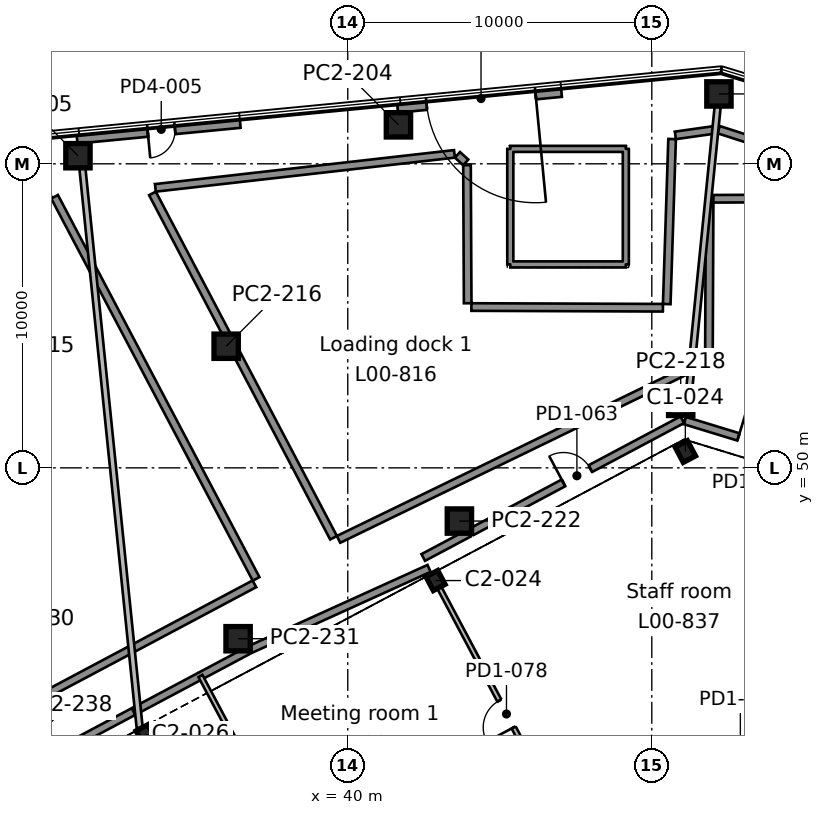
"""IFC4 building model, lengths in metres.
Left out: names, types, materials, properties, quantities, classifications, styles, units other than length and angle.
Written with IfcOpenShell. Run it as: python <this file> out.ifc"""

import sys

from ifc_helpers import new_model, si_unit, direction, frame, frame_2d, origin, origin_2d, place, context, subcontext, project, spatial, rectangle, i_section, extrude, element, fill, save


model = new_model("IFC4")
c1 = context("Model", 3, precision=1e-05, world=origin(), true_north=direction((0.0, 1.0)))
c2 = subcontext(c1, "Body", "Model", "MODEL_VIEW")
j1 = project(units=[si_unit("LENGTHUNIT", "METRE"), si_unit("PLANEANGLEUNIT", "RADIAN")], contexts=[c1])
p1 = place(None, origin())
s1 = spatial("IfcSite", under=j1, at=p1, CompositionType="ELEMENT")
p2 = place(p1, origin())
s2 = spatial("IfcBuilding", under=s1, at=p2, CompositionType="ELEMENT")
p3 = place(p2, origin())
s3 = spatial("IfcBuildingStorey", under=s2, at=p3, CompositionType="ELEMENT", Elevation=0.0)
for number, where, z_axis, x_axis in (
    (1, (33.351, 41.223, 0.0), (0.0, 0.0, 1.0), (-0.883, -0.469, 0.0)),
    (2, (42.887, 46.293, 0.0), (0.0, 0.0, 1.0), (-0.883, -0.469, 0.0)),
):
    element("IfcColumn", number, at=place(p3, frame(where, z_axis=z_axis, x_axis=x_axis)), inside=s3, PredefinedType="COLUMN", context=c2, shape_type="SweptSolid", body=[
        extrude(i_section(OverallWidth=0.437, OverallDepth=0.513, WebThickness=0.061, FlangeThickness=0.097, FilletRadius=0.015, at=origin_2d()), origin(), (0.0, 0.0, 1.0), 7.0),
    ])
p4 = place(p3, frame((51.103, 50.537, 0.0), z_axis=(0.0, 0.0, 1.0), x_axis=(-0.882947592859, -0.469471562786, 0.0)))
e3 = element("IfcColumn", 3, at=p4, inside=s3, PredefinedType="COLUMN", context=c2, shape_type="SweptSolid", body=[
    extrude(i_section(OverallWidth=0.455, OverallDepth=0.569, WebThickness=0.078, FlangeThickness=0.125, FilletRadius=0.015, at=origin_2d()), origin(), (0.0, 0.0, 1.0), 7.0),
])
for number, where, z_axis, x_axis in (
    (4, (36.393, 44.38, 0.0), (0.0, 0.0, 1.0), (1.0, 0.0, 0.0)),
    (5, (43.672, 48.25, 0.0), (0.0, 0.0, 1.0), (1.0, 0.0, 0.0)),
    (6, (50.95, 52.121, 0.0), (0.0, 0.0, 1.0), (1.0, 0.0, 0.0)),
    (7, (36.0, 54.0, 0.0), (0.0, 0.0, 1.0), (1.0, 0.0, 0.0)),
    (8, (31.126, 60.266, 0.0), (0.0, 0.0, 1.0), (1.0, 0.0, 0.0)),
    (9, (41.667, 61.282, 0.0), (0.0, 0.0, 1.0), (1.0, 0.0, 0.0)),
    (10, (52.208, 62.298, 0.0), (0.0, 0.0, 1.0), (1.0, 0.0, 0.0)),
):
    element("IfcColumn", number, at=place(p3, frame(where, z_axis=z_axis, x_axis=x_axis)), inside=s3, PredefinedType="COLUMN", context=c2, shape_type="SweptSolid", body=[
        extrude(rectangle(XDim=0.8, YDim=0.8, at=origin_2d()), origin(), (0.0, 0.0, 1.0), 6.37),
    ])
p5 = place(p3, frame((47.025, 62.401, 0.0), z_axis=(0.0, 0.0, 1.0), x_axis=(-0.995386045025, -0.095951140535, 0.0)))
e11 = element("IfcWall", 11, at=p5, inside=s3, PredefinedType="SOLIDWALL", context=c2, shape_type="SweptSolid", body=[
    extrude(rectangle(XDim=5.417, YDim=0.4, at=frame_2d((2.708, 0.0))), origin(), (0.0, 0.0, 1.0), 6.37),
])
p6 = place(p5, frame((0.854, 0.0, 0.0)))
e12 = element("IfcOpeningElement", 12, at=p6, cuts=e11, PredefinedType="OPENING", context=c2, shape_type="SweptSolid", body=[
    extrude(rectangle(XDim=3.6, YDim=4.5, at=frame_2d((1.8, 2.25))), frame((0.0, 0.21, 0.0), z_axis=(0.0, -1.0, 0.0), x_axis=(1.0, 0.0, 0.0)), (0.0, 0.0, 1.0), 0.42),
])
p7 = place(p3, frame((36.458, 61.382, 0.0), z_axis=(0.0, 0.0, 1.0), x_axis=(-0.99538901021, -0.095920375068, 0.0)))
e13 = element("IfcWall", 13, at=p7, inside=s3, PredefinedType="SOLIDWALL", context=c2, shape_type="SweptSolid", body=[
    extrude(rectangle(XDim=5.391, YDim=0.4, at=frame_2d((2.695, 0.0))), origin(), (0.0, 0.0, 1.0), 6.37),
])
p8 = place(p7, frame((2.154, 0.0, 0.0)))
e14 = element("IfcOpeningElement", 14, at=p8, cuts=e13, PredefinedType="OPENING", context=c2, shape_type="SweptSolid", body=[
    extrude(rectangle(XDim=0.9, YDim=2.1, at=frame_2d((0.45, 1.05))), frame((0.0, 0.21, 0.0), z_axis=(0.0, -1.0, 0.0), x_axis=(1.0, 0.0, 0.0)), (0.0, 0.0, 1.0), 0.42),
])
p9 = place(p3, frame((30.357, 58.915, 7.0), z_axis=(0.0, 0.0, 1.0), x_axis=(0.466457319903, -0.8845437065, 0.0)))
e15 = element("IfcWall", 15, at=p9, inside=s3, PredefinedType="STANDARD", context=c2, shape_type="SweptSolid", body=[
    extrude(rectangle(XDim=14.208, YDim=0.25, at=frame_2d((7.104, 0.0))), origin(), (0.0, 0.0, 1.0), 0.65),
])
p10 = place(p3, frame((36.929, 46.186, 7.0), z_axis=(0.0, 0.0, 1.0), x_axis=(-0.882949235495, -0.469468473423, 0.0)))
e16 = element("IfcWall", 16, at=p10, inside=s3, PredefinedType="STANDARD", context=c2, shape_type="SweptSolid", body=[
    extrude(rectangle(XDim=28.414, YDim=0.25, at=frame_2d((14.207, 0.0))), origin(), (0.0, 0.0, 1.0), 0.65),
])
p11 = place(p3, frame((51.808, 53.523, 7.0), z_axis=(0.0, 0.0, 1.0), x_axis=(-0.89970966322, -0.436488856569, 0.0)))
e17 = element("IfcWall", 17, at=p11, inside=s3, PredefinedType="STANDARD", context=c2, shape_type="SweptSolid", body=[
    extrude(rectangle(XDim=13.462, YDim=0.25, at=frame_2d((6.731, 0.0))), origin(), (0.0, 0.0, 1.0), 0.65),
])
p12 = place(p3, frame((39.532, 47.701, 7.0), z_axis=(0.0, 0.0, 1.0), x_axis=(-0.465482185558, 0.88505724952, 0.0)))
e18 = element("IfcWall", 18, at=p12, inside=s3, PredefinedType="STANDARD", context=c2, shape_type="SweptSolid", body=[
    extrude(rectangle(XDim=12.795, YDim=0.25, at=frame_2d((6.398, 0.0))), origin(), (0.0, 0.0, 1.0), 0.65),
])
p13 = place(p3, frame((33.673, 59.208, 7.0), z_axis=(0.0, 0.0, 1.0), x_axis=(0.993598399312, 0.112969999932, 0.0)))
e19 = element("IfcWall", 19, at=p13, inside=s3, PredefinedType="STANDARD", context=c2, shape_type="SweptSolid", body=[
    extrude(rectangle(XDim=9.9, YDim=0.25, at=frame_2d((4.95, 0.0))), origin(), (0.0, 0.0, 1.0), 0.65),
])
p14 = place(p3, frame((43.607, 60.295, 7.0), z_axis=(0.0, 0.0, 1.0), x_axis=(0.7400298403, -0.672574037163, 0.0)))
e20 = element("IfcWall", 20, at=p14, inside=s3, PredefinedType="STANDARD", context=c2, shape_type="SweptSolid", body=[
    extrude(rectangle(XDim=0.369, YDim=0.25, at=frame_2d((0.185, 0.0))), origin(), (0.0, 0.0, 1.0), 0.65),
])
p15 = place(p3, frame((43.922, 59.955, 7.0), z_axis=(0.0, 0.0, 1.0), x_axis=(0.004999399945, -0.999987502922, 0.0)))
e21 = element("IfcWall", 21, at=p15, inside=s3, PredefinedType="STANDARD", context=c2, shape_type="SweptSolid", body=[
    extrude(rectangle(XDim=4.542, YDim=0.25, at=frame_2d((2.271, 0.0))), origin(), (0.0, 0.0, 1.0), 0.65),
])
p16 = place(p3, frame((44.066, 55.289, 7.0), z_axis=(0.0, 0.0, 1.0), x_axis=(0.999993223506, -0.003681432135, 0.0)))
e22 = element("IfcWall", 22, at=p16, inside=s3, PredefinedType="STANDARD", context=c2, shape_type="SweptSolid", body=[
    extrude(rectangle(XDim=6.3, YDim=0.25, at=frame_2d((3.15, 0.0))), origin(), (0.0, 0.0, 1.0), 0.65),
])
p17 = place(p3, frame((50.491, 55.387, 7.0), z_axis=(0.0, 0.0, 1.0), x_axis=(0.032503507659, 0.999471621403, 0.0)))
e23 = element("IfcWall", 23, at=p17, inside=s3, PredefinedType="STANDARD", context=c2, shape_type="SweptSolid", body=[
    extrude(rectangle(XDim=5.431, YDim=0.25, at=frame_2d((2.715, 0.0))), origin(), (0.0, 0.0, 1.0), 0.65),
])
p18 = place(p3, frame((50.775, 60.934, 7.0), z_axis=(0.0, 0.0, 1.0), x_axis=(0.990122021984, 0.140208350613, 0.0)))
e24 = element("IfcWall", 24, at=p18, inside=s3, PredefinedType="STANDARD", context=c2, shape_type="SweptSolid", body=[
    extrude(rectangle(XDim=1.381, YDim=0.25, at=frame_2d((0.69, 0.0))), origin(), (0.0, 0.0, 1.0), 0.65),
])
p19 = place(p3, frame((52.198, 61.123, 7.0), z_axis=(0.0, 0.0, 1.0), x_axis=(0.951593022615, -0.307360894243, 0.0)))
e25 = element("IfcWall", 25, at=p19, inside=s3, PredefinedType="STANDARD", context=c2, shape_type="SweptSolid", body=[
    extrude(rectangle(XDim=5.816, YDim=0.25, at=frame_2d((2.908, 0.0))), origin(), (0.0, 0.0, 1.0), 0.65),
])
p20 = place(p3, frame((57.574, 58.872, 7.0), z_axis=(0.0, 0.0, 1.0), x_axis=(-0.999991626198, -0.004092374972, 0.0)))
e26 = element("IfcWall", 26, at=p20, inside=s3, PredefinedType="STANDARD", context=c2, shape_type="SweptSolid", body=[
    extrude(rectangle(XDim=5.548, YDim=0.25, at=frame_2d((2.774, 0.0))), origin(), (0.0, 0.0, 1.0), 0.65),
])
p21 = place(p3, frame((51.901, 58.727, 7.0), z_axis=(0.0, 0.0, 1.0), x_axis=(-0.004458890324, -0.999990059099, 0.0)))
e27 = element("IfcWall", 27, at=p21, inside=s3, PredefinedType="STANDARD", context=c2, shape_type="SweptSolid", body=[
    extrude(rectangle(XDim=5.092, YDim=0.25, at=frame_2d((2.546, 0.0))), origin(), (0.0, 0.0, 1.0), 0.65),
])
for number, where, z_axis, x_axis in (
    (28, (49.146, 56.691, 6.92), (0.0, 0.0, 1.0), (-1.0, 0.0, 0.0)),
    (29, (45.346, 56.691, 6.92), (0.0, 0.0, 1.0), (0.0, 1.0, 0.0)),
    (30, (45.346, 60.491, 6.92), (0.0, 0.0, 1.0), (1.0, 0.0, 0.0)),
    (31, (49.146, 60.491, 6.92), (0.0, 0.0, 1.0), (0.0, -1.0, 0.0)),
):
    element("IfcWall", number, at=place(p3, frame(where, z_axis=z_axis, x_axis=x_axis)), inside=s3, PredefinedType="SOLIDWALL", context=c2, shape_type="SweptSolid", body=[
        extrude(rectangle(XDim=3.8, YDim=0.2, at=frame_2d((1.9, 0.0))), origin(), (0.0, 0.0, 1.0), 0.18),
    ])
p22 = place(p3, frame((52.168, 61.898, 0.0), z_axis=(0.0, 0.0, 1.0), x_axis=(-0.100124403506, -0.994974926228, 0.0)))
e32 = element("IfcWall", 32, at=p22, inside=s3, PredefinedType="PARTITIONING", context=c2, shape_type="SweptSolid", body=[
    extrude(rectangle(XDim=9.424, YDim=0.2, at=frame_2d((4.712, 0.0))), origin(), (0.0, 0.0, 1.0), 6.37),
])
p23 = place(p3, frame((51.087, 51.556, 0.0), z_axis=(0.0, 0.0, 1.0), x_axis=(0.956310816829, -0.292351879788, 0.0)))
e33 = element("IfcWall", 33, at=p23, inside=s3, PredefinedType="SOLIDWALL", context=c2, shape_type="SweptSolid", body=[
    extrude(rectangle(XDim=4.651, YDim=0.25, at=frame_2d((2.326, 0.0))), origin(), (0.0, 0.0, 1.0), 6.37),
])
p24 = place(p23, frame((1.844, 0.0, 0.0)))
e34 = element("IfcOpeningElement", 34, at=p24, cuts=e33, PredefinedType="OPENING", context=c2, shape_type="SweptSolid", body=[
    extrude(rectangle(XDim=1.0, YDim=2.1, at=frame_2d((0.5, 1.05))), frame((0.0, 0.135, 0.0), z_axis=(0.0, -1.0, 0.0), x_axis=(1.0, 0.0, 0.0)), (0.0, 0.0, 1.0), 0.27),
])
p25 = place(p3, frame((31.271, 59.866, 0.0), z_axis=(0.0, 0.0, 1.0), x_axis=(0.10182537806, -0.994802288087, 0.0)))
e35 = element("IfcWall", 35, at=p25, inside=s3, PredefinedType="PARTITIONING", context=c2, shape_type="SweptSolid", body=[
    extrude(rectangle(XDim=18.51, YDim=0.2, at=frame_2d((9.255, 0.0))), origin(), (0.0, 0.0, 1.0), 6.37),
])
p26 = place(p3, frame((32.989, 42.004, 0.0), z_axis=(0.0, 0.0, 1.0), x_axis=(0.882961044449, 0.46944626315, 0.0)))
e36 = element("IfcWall", 36, at=p26, inside=s3, PredefinedType="SOLIDWALL", context=c2, shape_type="SweptSolid", body=[
    extrude(rectangle(XDim=2.453, YDim=0.25, at=frame_2d((1.227, 0.0))), origin(), (0.0, 0.0, 1.0), 6.37),
])
p27 = place(p3, frame((35.155, 43.156, 0.0), z_axis=(0.0, 0.0, 1.0), x_axis=(0.882941057782, 0.469483853272, 0.0)))
e37 = element("IfcWall", 37, at=p27, inside=s3, PredefinedType="SOLIDWALL", context=c2, shape_type="SweptSolid", body=[
    extrude(rectangle(XDim=1.756, YDim=0.25, at=frame_2d((0.878, 0.0))), origin(), (0.0, 0.0, 1.0), 6.37),
])
p28 = place(p3, frame((36.793, 44.027, 0.0), z_axis=(0.0, 0.0, 1.0), x_axis=(0.910758391685, 0.412939646892, 0.0)))
e38 = element("IfcWall", 38, at=p28, inside=s3, PredefinedType="SOLIDWALL", context=c2, shape_type="SweptSolid", body=[
    extrude(rectangle(XDim=6.457, YDim=0.25, at=frame_2d((3.229, 0.0))), origin(), (0.0, 0.0, 1.0), 6.37),
])
p29 = place(p3, frame((42.483, 47.052, 0.0), z_axis=(0.0, 0.0, 1.0), x_axis=(0.882940813988, 0.469484311766, 0.0)))
e39 = element("IfcWall", 39, at=p29, inside=s3, PredefinedType="SOLIDWALL", context=c2, shape_type="SweptSolid", body=[
    extrude(rectangle(XDim=1.699, YDim=0.25, at=frame_2d((0.85, 0.0))), origin(), (0.0, 0.0, 1.0), 6.37),
])
p30 = place(p3, frame((44.072, 47.897, 0.0), z_axis=(0.0, 0.0, 1.0), x_axis=(0.882948932855, 0.469469042612, 0.0)))
e40 = element("IfcWall", 40, at=p30, inside=s3, PredefinedType="SOLIDWALL", context=c2, shape_type="SweptSolid", body=[
    extrude(rectangle(XDim=7.849, YDim=0.25, at=frame_2d((3.924, 0.0))), origin(), (0.0, 0.0, 1.0), 6.37),
])
p31 = place(p30, frame((3.424, 0.0, 0.0)))
e41 = element("IfcOpeningElement", 41, at=p31, cuts=e40, PredefinedType="OPENING", context=c2, shape_type="SweptSolid", body=[
    extrude(rectangle(XDim=1.0, YDim=2.1, at=frame_2d((0.5, 1.05))), frame((0.0, 0.135, 0.0), z_axis=(0.0, -1.0, 0.0), x_axis=(1.0, 0.0, 0.0)), (0.0, 0.0, 1.0), 0.27),
])
p32 = place(p3, frame((29.514, 40.156, 0.0), z_axis=(0.0, 0.0, 1.0), x_axis=(0.882952549127, 0.469462241283, 0.0)))
e42 = element("IfcWall", 42, at=p32, inside=s3, PredefinedType="SOLIDWALL", context=c2, shape_type="SweptSolid", body=[
    extrude(rectangle(XDim=3.895, YDim=0.25, at=frame_2d((1.948, 0.0))), origin(), (0.0, 0.0, 1.0), 6.37),
])
p33 = place(p3, frame((58.046, 43.095, 0.0), z_axis=(0.0, 0.0, 1.0), x_axis=(-0.882944872937, -0.469476678179, 0.0)))
e43 = element("IfcWall", 43, at=p33, inside=s3, PredefinedType="PARTITIONING", context=c2, shape_type="SweptSolid", body=[
    extrude(rectangle(XDim=11.586, YDim=0.15, at=frame_2d((5.793, 0.0))), origin(), (0.0, 0.0, 1.0), 6.55),
])
p34 = place(p33, frame((5.314, 0.0, 0.0)))
e44 = element("IfcOpeningElement", 44, at=p34, cuts=e43, PredefinedType="OPENING", context=c2, shape_type="SweptSolid", body=[
    extrude(rectangle(XDim=1.0, YDim=2.1, at=frame_2d((0.5, 1.05))), frame((0.0, 0.085, 0.0), z_axis=(0.0, -1.0, 0.0), x_axis=(1.0, 0.0, 0.0)), (0.0, 0.0, 1.0), 0.17),
])
p35 = place(p3, frame((40.225, 33.62, 0.0), z_axis=(0.0, 0.0, 1.0), x_axis=(-0.469470880923, 0.882947955411, 0.0)))
e45 = element("IfcWall", 45, at=p35, inside=s3, PredefinedType="PARTITIONING", context=c2, shape_type="SweptSolid", body=[
    extrude(rectangle(XDim=10.8, YDim=0.15, at=frame_2d((5.4, 0.0))), origin(), (0.0, 0.0, 1.0), 6.55),
])
p36 = place(p3, frame((47.385, 37.832, 0.0), z_axis=(0.0, 0.0, 1.0), x_axis=(-0.469472297485, 0.882947202212, 0.0)))
e46 = element("IfcWall", 46, at=p36, inside=s3, PredefinedType="PARTITIONING", context=c2, shape_type="SweptSolid", body=[
    extrude(rectangle(XDim=9.326, YDim=0.15, at=frame_2d((4.663, 0.0))), origin(), (0.0, 0.0, 1.0), 6.55),
])
p37 = place(p36, frame((4.112, 0.0, 0.0)))
e47 = element("IfcOpeningElement", 47, at=p37, cuts=e46, PredefinedType="OPENING", context=c2, shape_type="SweptSolid", body=[
    extrude(rectangle(XDim=1.0, YDim=2.1, at=frame_2d((0.5, 1.05))), frame((0.0, 0.085, 0.0), z_axis=(0.0, -1.0, 0.0), x_axis=(1.0, 0.0, 0.0)), (0.0, 0.0, 1.0), 0.17),
])
p38 = place(p6, origin())
e48 = element("IfcDoor", 48, at=p38, inside=s3, OperationType="SLIDING_TO_LEFT", PredefinedType="DOOR", context=c2, shape_type="SweptSolid", body=[
    extrude(rectangle(XDim=3.6, YDim=4.5, at=frame_2d((1.8, 2.25))), frame((0.0, 0.025, 0.0), z_axis=(0.0, -1.0, 0.0), x_axis=(1.0, 0.0, 0.0)), (0.0, 0.0, 1.0), 0.05),
])
fill(e12, e48)
p39 = place(p8, origin())
e49 = element("IfcDoor", 49, at=p39, inside=s3, OperationType="SINGLE_SWING_RIGHT", PredefinedType="DOOR", context=c2, shape_type="SweptSolid", body=[
    extrude(rectangle(XDim=0.9, YDim=2.1, at=frame_2d((0.45, 1.05))), frame((0.0, 0.025, 0.0), z_axis=(0.0, -1.0, 0.0), x_axis=(1.0, 0.0, 0.0)), (0.0, 0.0, 1.0), 0.05),
])
fill(e14, e49)
p40 = place(p3, frame((0.0, 0.0, 6.37)))
p41 = place(p40, frame((47.246, 58.591, 0.0)))
p42 = place(p41, frame((0.0, 0.0, 0.5)))
e50 = element("IfcWindow", 50, at=p42, inside=s3, PartitioningType="SINGLE_PANEL", PredefinedType="SKYLIGHT", context=c2, shape_type="SweptSolid", body=[
    extrude(rectangle(XDim=3.6, YDim=3.6, at=origin_2d()), origin(), (0.0, 0.0, 1.0), 0.05),
])
p43 = place(p37, origin())
e51 = element("IfcDoor", 51, at=p43, inside=s3, OperationType="SINGLE_SWING_LEFT", PredefinedType="DOOR", context=c2, shape_type="SweptSolid", body=[
    extrude(rectangle(XDim=1.0, YDim=2.1, at=frame_2d((0.5, 1.05))), frame((0.0, 0.025, 0.0), z_axis=(0.0, -1.0, 0.0), x_axis=(1.0, 0.0, 0.0)), (0.0, 0.0, 1.0), 0.05),
])
fill(e47, e51)
p44 = place(p31, origin())
e52 = element("IfcDoor", 52, at=p44, inside=s3, OperationType="SINGLE_SWING_LEFT", PredefinedType="DOOR", context=c2, shape_type="SweptSolid", body=[
    extrude(rectangle(XDim=1.0, YDim=2.1, at=frame_2d((0.5, 1.05))), frame((0.0, 0.025, 0.0), z_axis=(0.0, -1.0, 0.0), x_axis=(1.0, 0.0, 0.0)), (0.0, 0.0, 1.0), 0.05),
])
fill(e41, e52)
p45 = place(p24, origin())
e53 = element("IfcDoor", 53, at=p45, inside=s3, OperationType="SINGLE_SWING_LEFT", PredefinedType="DOOR", context=c2, shape_type="SweptSolid", body=[
    extrude(rectangle(XDim=1.0, YDim=2.1, at=frame_2d((0.5, 1.05))), frame((0.0, 0.025, 0.0), z_axis=(0.0, -1.0, 0.0), x_axis=(1.0, 0.0, 0.0)), (0.0, 0.0, 1.0), 0.05),
])
fill(e34, e53)
save(model, sys.argv[1])
